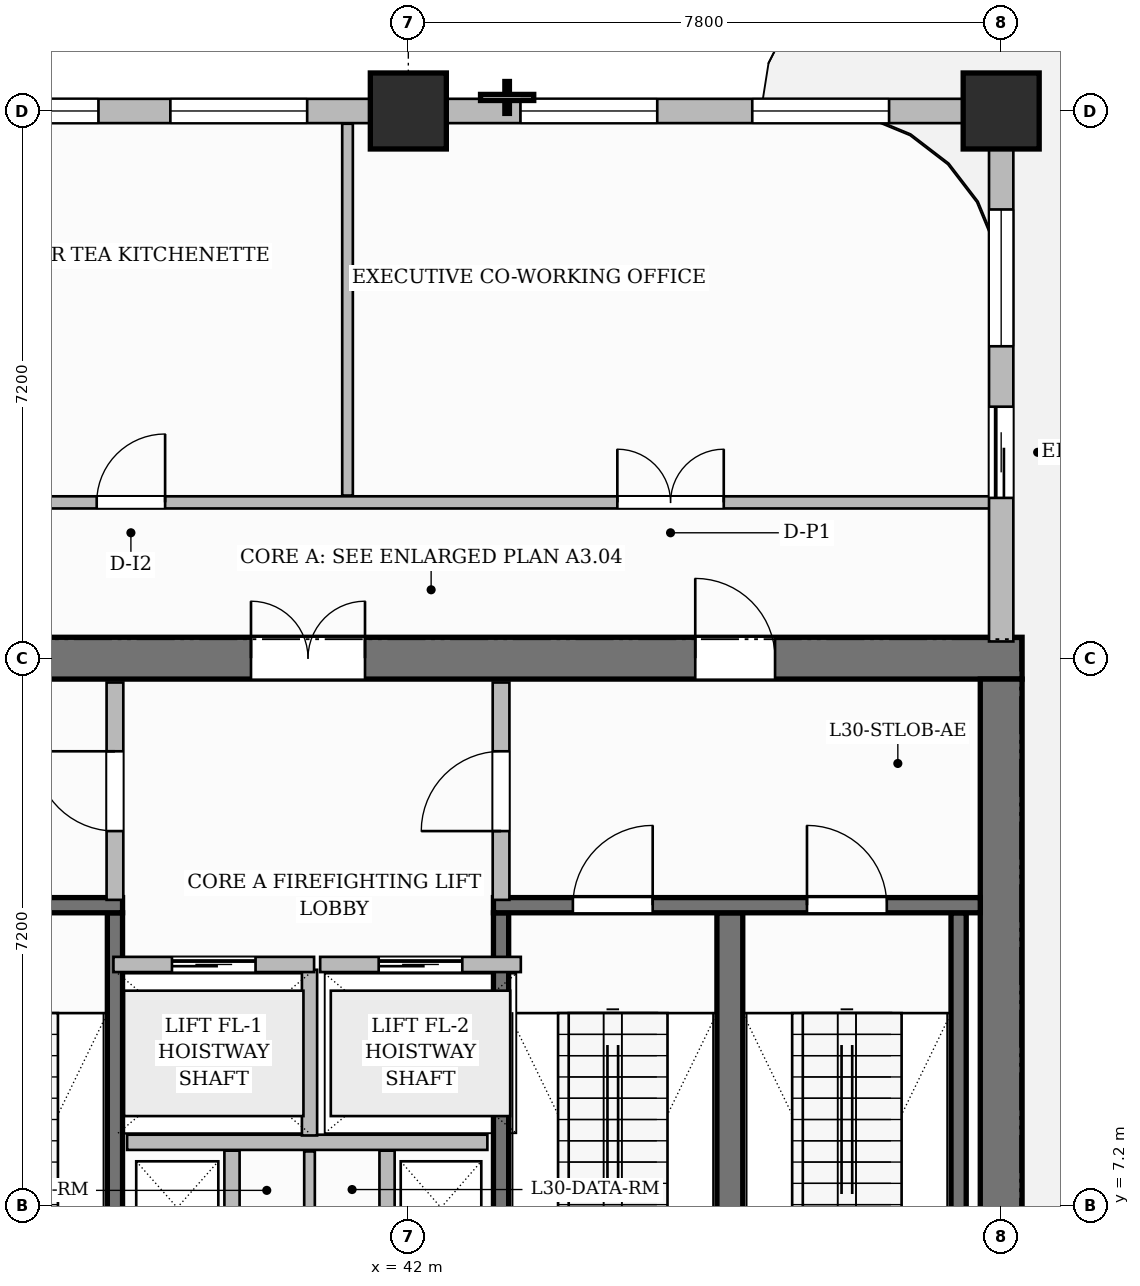
"""IFC4 building model, lengths in metres.
Left out: names, types, materials, properties, quantities, classifications, styles, units other than length and angle.
Written with IfcOpenShell. Run it as: python <this file> out.ifc"""

import sys

from ifc_helpers import new_model, si_unit, direction, frame, frame_2d, origin, origin_2d, place, context, subcontext, project, spatial, rectangle, extrude, source, transform, mapped, element, fill, save


model = new_model("IFC4")
c1 = context("Model", 3, precision=1e-05, world=origin(), true_north=direction((0.0, 1.0)))
c2 = subcontext(c1, "Body", "Model", "MODEL_VIEW")
j1 = project(units=[si_unit("LENGTHUNIT", "METRE"), si_unit("PLANEANGLEUNIT", "RADIAN")], contexts=[c1])
p1 = place(None, origin())
s1 = spatial("IfcSite", under=j1, at=p1, CompositionType="ELEMENT")
p2 = place(p1, origin())
s2 = spatial("IfcBuilding", under=s1, at=p2, CompositionType="ELEMENT")
p3 = place(p2, frame((0.0, 0.0, 122.9)))
s3 = spatial("IfcBuildingStorey", under=s2, at=p3, CompositionType="ELEMENT", Elevation=122.9)
p4 = place(p3, frame((34.525, 14.4, 0.0), z_axis=(0.0, 0.0, 1.0), x_axis=(1.0, 0.0, 0.0)))
e1 = element("IfcWall", 1, at=p4, inside=s3, PredefinedType="SHEAR", context=c2, shape_type="SweptSolid", body=[
    extrude(rectangle(XDim=15.55, YDim=0.55, at=frame_2d((7.775, 0.0))), origin(), (0.0, 0.0, 1.0), 3.7),
])
p5 = place(p4, frame((5.405, 0.0, 0.0)))
e2 = element("IfcOpeningElement", 2, at=p5, cuts=e1, PredefinedType="OPENING", context=c2, shape_type="SweptSolid", body=[
    extrude(rectangle(XDim=1.5, YDim=2.2, at=frame_2d((0.75, 1.1))), frame((0.0, 0.285, 0.0), z_axis=(0.0, -1.0, 0.0), x_axis=(1.0, 0.0, 0.0)), (0.0, 0.0, 1.0), 0.57),
])
p6 = place(p4, frame((1.62, 0.0, 0.0)))
e3 = element("IfcOpeningElement", 3, at=p6, cuts=e1, PredefinedType="OPENING", context=c2, shape_type="SweptSolid", body=[
    extrude(rectangle(XDim=1.05, YDim=2.15, at=frame_2d((0.525, 1.075))), frame((0.0, 0.285, 0.0), z_axis=(0.0, -1.0, 0.0), x_axis=(1.0, 0.0, 0.0)), (0.0, 0.0, 1.0), 0.57),
])
p7 = place(p4, frame((11.25, 0.0, 0.0)))
e4 = element("IfcOpeningElement", 4, at=p7, cuts=e1, PredefinedType="OPENING", context=c2, shape_type="SweptSolid", body=[
    extrude(rectangle(XDim=1.05, YDim=2.15, at=frame_2d((0.525, 1.075))), frame((0.0, 0.285, 0.0), z_axis=(0.0, -1.0, 0.0), x_axis=(1.0, 0.0, 0.0)), (0.0, 0.0, 1.0), 0.57),
])
p8 = place(p3, frame((49.8, 3.875, 0.0), z_axis=(0.0, 0.0, 1.0), x_axis=(0.0, 1.0, 0.0)))
e5 = element("IfcWall", 5, at=p8, inside=s3, PredefinedType="SHEAR", context=c2, shape_type="SweptSolid", body=[
    extrude(rectangle(XDim=10.25, YDim=0.55, at=frame_2d((5.125, 0.0))), origin(), (0.0, 0.0, 1.0), 3.7),
])
m1 = source(origin(), c2, "Body", "SweptSolid", [
    extrude(rectangle(XDim=1.0, YDim=1.0, at=origin_2d()), origin(), (0.0, 0.0, 1.0), 3.7),
])
for number, where, z_axis, x_axis in (
    (6, (42.0, 21.6, 0.0), (0.0, 0.0, 1.0), (1.0, 0.0, 0.0)),
    (7, (49.8, 21.6, 0.0), (0.0, 0.0, 1.0), (1.0, 0.0, 0.0)),
):
    element("IfcColumn", number, at=place(p3, frame(where, z_axis=z_axis, x_axis=x_axis)), inside=s3, PredefinedType="COLUMN", context=c2, shape_type="MappedRepresentation", body=[
        mapped(m1, transform((0.0, 0.0, 0.0), scale=1.0)),
    ])
p9 = place(p3, frame((38.14, 4.1, 0.0), z_axis=(0.0, 0.0, 1.0), x_axis=(0.0, 1.0, 0.0)))
e8 = element("IfcWall", 8, at=p9, inside=s3, PredefinedType="SHEAR", context=c2, shape_type="SweptSolid", body=[
    extrude(rectangle(XDim=6.95, YDim=0.2, at=frame_2d((3.475, 0.0))), origin(), (0.0, 0.0, 1.0), 3.7),
])
p10 = place(p3, frame((35.075, 11.15, 0.0), z_axis=(0.0, 0.0, 1.0), x_axis=(1.0, 0.0, 0.0)))
e9 = element("IfcWall", 9, at=p10, inside=s3, PredefinedType="SHEAR", context=c2, shape_type="SweptSolid", body=[
    extrude(rectangle(XDim=3.165, YDim=0.2, at=frame_2d((1.583, 0.0))), origin(), (0.0, 0.0, 1.0), 3.7),
])
p11 = place(p10, frame((1.07, 0.0, 0.0)))
e10 = element("IfcOpeningElement", 10, at=p11, cuts=e9, PredefinedType="OPENING", context=c2, shape_type="SweptSolid", body=[
    extrude(rectangle(XDim=1.05, YDim=2.2, at=frame_2d((0.525, 1.1))), frame((0.0, 0.11, 0.0), z_axis=(0.0, -1.0, 0.0), x_axis=(1.0, 0.0, 0.0)), (0.0, 0.0, 1.0), 0.22),
])
p12 = place(p3, frame((43.22, 4.1, 0.0), z_axis=(0.0, 0.0, 1.0), x_axis=(0.0, 1.0, 0.0)))
e11 = element("IfcWall", 11, at=p12, inside=s3, PredefinedType="SHEAR", context=c2, shape_type="SweptSolid", body=[
    extrude(rectangle(XDim=6.95, YDim=0.2, at=frame_2d((3.475, 0.0))), origin(), (0.0, 0.0, 1.0), 3.7),
])
p13 = place(p3, frame((46.23, 4.1, 0.0), z_axis=(0.0, 0.0, 1.0), x_axis=(0.0, 1.0, 0.0)))
e12 = element("IfcWall", 12, at=p13, inside=s3, PredefinedType="SHEAR", context=c2, shape_type="SweptSolid", body=[
    extrude(rectangle(XDim=6.95, YDim=0.34, at=frame_2d((3.475, 0.0))), origin(), (0.0, 0.0, 1.0), 3.7),
])
p14 = place(p3, frame((49.24, 4.1, 0.0), z_axis=(0.0, 0.0, 1.0), x_axis=(0.0, 1.0, 0.0)))
e13 = element("IfcWall", 13, at=p14, inside=s3, PredefinedType="SHEAR", context=c2, shape_type="SweptSolid", body=[
    extrude(rectangle(XDim=6.95, YDim=0.2, at=frame_2d((3.475, 0.0))), origin(), (0.0, 0.0, 1.0), 3.7),
])
p15 = place(p3, frame((43.12, 11.15, 0.0), z_axis=(0.0, 0.0, 1.0), x_axis=(1.0, 0.0, 0.0)))
e14 = element("IfcWall", 14, at=p15, inside=s3, PredefinedType="SHEAR", context=c2, shape_type="SweptSolid", body=[
    extrude(rectangle(XDim=6.405, YDim=0.2, at=frame_2d((3.202, 0.0))), origin(), (0.0, 0.0, 1.0), 3.7),
])
p16 = place(p15, frame((1.045, 0.0, 0.0)))
e15 = element("IfcOpeningElement", 15, at=p16, cuts=e14, PredefinedType="OPENING", context=c2, shape_type="SweptSolid", body=[
    extrude(rectangle(XDim=1.05, YDim=2.2, at=frame_2d((0.525, 1.1))), frame((0.0, 0.11, 0.0), z_axis=(0.0, -1.0, 0.0), x_axis=(1.0, 0.0, 0.0)), (0.0, 0.0, 1.0), 0.22),
])
p17 = place(p15, frame((4.125, 0.0, 0.0)))
e16 = element("IfcOpeningElement", 16, at=p17, cuts=e14, PredefinedType="OPENING", context=c2, shape_type="SweptSolid", body=[
    extrude(rectangle(XDim=1.05, YDim=2.2, at=frame_2d((0.525, 1.1))), frame((0.0, 0.11, 0.0), z_axis=(0.0, -1.0, 0.0), x_axis=(1.0, 0.0, 0.0)), (0.0, 0.0, 1.0), 0.22),
])
p18 = place(p3, frame((38.3, 8.03, 0.0), z_axis=(0.0, 0.0, 1.0), x_axis=(1.0, 0.0, 0.0)))
e17 = element("IfcWall", 17, at=p18, inside=s3, PredefinedType="PARTITIONING", context=c2, shape_type="SweptSolid", body=[
    extrude(rectangle(XDim=4.74, YDim=0.2, at=frame_2d((2.37, 0.0))), origin(), (0.0, 0.0, 1.0), 3.45),
])
p19 = place(p3, frame((40.7, 8.12, 0.0), z_axis=(0.0, 0.0, 1.0), x_axis=(0.0, 1.0, 0.0)))
e18 = element("IfcWall", 18, at=p19, inside=s3, PredefinedType="PARTITIONING", context=c2, shape_type="SweptSolid", body=[
    extrude(rectangle(XDim=2.18, YDim=0.2, at=frame_2d((1.09, 0.0))), origin(), (0.0, 0.0, 1.0), 3.45),
])
p20 = place(p3, frame((38.14, 11.22, 0.0), z_axis=(0.0, 0.0, 1.0), x_axis=(0.0, 1.0, 0.0)))
e19 = element("IfcWall", 19, at=p20, inside=s3, PredefinedType="PARTITIONING", context=c2, shape_type="SweptSolid", body=[
    extrude(rectangle(XDim=2.86, YDim=0.22, at=frame_2d((1.43, 0.0))), origin(), (0.0, 0.0, 1.0), 3.45),
])
p21 = place(p20, frame((0.905, 0.0, 0.0)))
e20 = element("IfcOpeningElement", 20, at=p21, cuts=e19, PredefinedType="OPENING", context=c2, shape_type="SweptSolid", body=[
    extrude(rectangle(XDim=1.05, YDim=2.15, at=frame_2d((0.525, 1.075))), frame((0.0, 0.12, 0.0), z_axis=(0.0, -1.0, 0.0), x_axis=(1.0, 0.0, 0.0)), (0.0, 0.0, 1.0), 0.24),
])
p22 = place(p3, frame((43.22, 11.22, 0.0), z_axis=(0.0, 0.0, 1.0), x_axis=(0.0, 1.0, 0.0)))
e21 = element("IfcWall", 21, at=p22, inside=s3, PredefinedType="PARTITIONING", context=c2, shape_type="SweptSolid", body=[
    extrude(rectangle(XDim=2.86, YDim=0.22, at=frame_2d((1.43, 0.0))), origin(), (0.0, 0.0, 1.0), 3.45),
])
p23 = place(p22, frame((0.905, 0.0, 0.0)))
e22 = element("IfcOpeningElement", 22, at=p23, cuts=e21, PredefinedType="OPENING", context=c2, shape_type="SweptSolid", body=[
    extrude(rectangle(XDim=1.05, YDim=2.15, at=frame_2d((0.525, 1.075))), frame((0.0, 0.12, 0.0), z_axis=(0.0, -1.0, 0.0), x_axis=(1.0, 0.0, 0.0)), (0.0, 0.0, 1.0), 0.24),
])
for number, where, z_axis, x_axis in (
    (23, (39.68, 6.13, 0.0), (0.0, 0.0, 1.0), (0.0, 1.0, 0.0)),
    (24, (41.72, 6.13, 0.0), (0.0, 0.0, 1.0), (0.0, 1.0, 0.0)),
):
    element("IfcWall", number, at=place(p3, frame(where, z_axis=z_axis, x_axis=x_axis)), inside=s3, PredefinedType="PARTITIONING", context=c2, shape_type="SweptSolid", body=[
        extrude(rectangle(XDim=1.79, YDim=0.2, at=frame_2d((0.895, 0.0))), origin(), (0.0, 0.0, 1.0), 3.45),
    ])
p24 = place(p3, frame((40.7, 3.895, 0.0), z_axis=(0.0, 0.0, 1.0), x_axis=(0.0, 1.0, 0.0)))
e25 = element("IfcWall", 25, at=p24, inside=s3, PredefinedType="PARTITIONING", context=c2, shape_type="SweptSolid", body=[
    extrude(rectangle(XDim=4.015, YDim=0.14, at=frame_2d((2.007, 0.0))), origin(), (0.0, 0.0, 1.0), 3.45),
])
p25 = place(p3, frame((32.19, 16.45, 0.0), z_axis=(0.0, 0.0, 1.0), x_axis=(1.0, 0.0, 0.0)))
e26 = element("IfcWall", 26, at=p25, inside=s3, PredefinedType="PARTITIONING", context=c2, shape_type="SweptSolid", body=[
    extrude(rectangle(XDim=17.47, YDim=0.16, at=frame_2d((8.735, 0.0))), origin(), (0.0, 0.0, 1.0), 3.45),
])
p26 = place(p25, frame((1.185, 0.0, 0.0)))
e27 = element("IfcOpeningElement", 27, at=p26, cuts=e26, PredefinedType="OPENING", context=c2, shape_type="SweptSolid", body=[
    extrude(rectangle(XDim=0.85, YDim=2.1, at=frame_2d((0.425, 1.05))), frame((0.0, 0.09, 0.0), z_axis=(0.0, -1.0, 0.0), x_axis=(1.0, 0.0, 0.0)), (0.0, 0.0, 1.0), 0.18),
])
p27 = place(p25, frame((5.71, 0.0, 0.0)))
e28 = element("IfcOpeningElement", 28, at=p27, cuts=e26, PredefinedType="OPENING", context=c2, shape_type="SweptSolid", body=[
    extrude(rectangle(XDim=0.9, YDim=2.15, at=frame_2d((0.45, 1.075))), frame((0.0, 0.09, 0.0), z_axis=(0.0, -1.0, 0.0), x_axis=(1.0, 0.0, 0.0)), (0.0, 0.0, 1.0), 0.18),
])
p28 = place(p25, frame((12.56, 0.0, 0.0)))
e29 = element("IfcOpeningElement", 29, at=p28, cuts=e26, PredefinedType="OPENING", context=c2, shape_type="SweptSolid", body=[
    extrude(rectangle(XDim=1.4, YDim=2.35, at=frame_2d((0.7, 1.175))), frame((0.0, 0.09, 0.0), z_axis=(0.0, -1.0, 0.0), x_axis=(1.0, 0.0, 0.0)), (0.0, 0.0, 1.0), 0.18),
])
p29 = place(p3, frame((41.2, 16.54, 0.0), z_axis=(0.0, 0.0, 1.0), x_axis=(0.0, 1.0, 0.0)))
e30 = element("IfcWall", 30, at=p29, inside=s3, PredefinedType="PARTITIONING", context=c2, shape_type="SweptSolid", body=[
    extrude(rectangle(XDim=4.892, YDim=0.14, at=frame_2d((2.446, 0.0))), origin(), (0.0, 0.0, 1.0), 3.45),
])
p30 = place(p3, frame((38.12, 10.37, 0.0), z_axis=(0.0, 0.0, 1.0), x_axis=(1.0, 0.0, 0.0)))
e31 = element("IfcWall", 31, at=p30, inside=s3, PredefinedType="PARTITIONING", context=c2, shape_type="SweptSolid", body=[
    extrude(rectangle(XDim=2.64, YDim=0.2, at=frame_2d((1.32, 0.0))), origin(), (0.0, 0.0, 1.0), 3.45),
])
p31 = place(p30, frame((0.77, 0.0, 0.0)))
e32 = element("IfcOpeningElement", 32, at=p31, cuts=e31, PredefinedType="OPENING", context=c2, shape_type="SweptSolid", body=[
    extrude(rectangle(XDim=1.1, YDim=2.2, at=frame_2d((0.55, 1.1))), frame((0.0, 0.11, 0.0), z_axis=(0.0, -1.0, 0.0), x_axis=(1.0, 0.0, 0.0)), (0.0, 0.0, 1.0), 0.22),
])
p32 = place(p3, frame((40.84, 10.37, 0.0), z_axis=(0.0, 0.0, 1.0), x_axis=(1.0, 0.0, 0.0)))
e33 = element("IfcWall", 33, at=p32, inside=s3, PredefinedType="PARTITIONING", context=c2, shape_type="SweptSolid", body=[
    extrude(rectangle(XDim=2.64, YDim=0.2, at=frame_2d((1.32, 0.0))), origin(), (0.0, 0.0, 1.0), 3.45),
])
p33 = place(p32, frame((0.77, 0.0, 0.0)))
e34 = element("IfcOpeningElement", 34, at=p33, cuts=e33, PredefinedType="OPENING", context=c2, shape_type="SweptSolid", body=[
    extrude(rectangle(XDim=1.1, YDim=2.2, at=frame_2d((0.55, 1.1))), frame((0.0, 0.11, 0.0), z_axis=(0.0, -1.0, 0.0), x_axis=(1.0, 0.0, 0.0)), (0.0, 0.0, 1.0), 0.22),
])
p34 = place(p3, frame((49.8, 14.62, 0.0), z_axis=(0.0, 0.0, 1.0), x_axis=(0.0, 1.0, 0.0)))
e35 = element("IfcWall", 35, at=p34, inside=s3, PredefinedType="SOLIDWALL", context=c2, shape_type="SweptSolid", body=[
    extrude(rectangle(XDim=6.93, YDim=0.32, at=frame_2d((3.465, 0.0))), origin(), (0.0, 0.0, 1.0), 2.935),
])
p35 = place(p34, frame((1.889, 0.0, 0.0)))
e36 = element("IfcOpeningElement", 36, at=p35, cuts=e35, PredefinedType="OPENING", context=c2, shape_type="SweptSolid", body=[
    extrude(rectangle(XDim=1.2, YDim=2.2, at=frame_2d((0.6, 1.1))), frame((0.0, 0.17, 0.0), z_axis=(0.0, -1.0, 0.0), x_axis=(1.0, 0.0, 0.0)), (0.0, 0.0, 1.0), 0.34),
])
p36 = place(p34, frame((3.884, 0.0, 0.8)))
e37 = element("IfcOpeningElement", 37, at=p36, cuts=e35, PredefinedType="OPENING", context=c2, shape_type="SweptSolid", body=[
    extrude(rectangle(XDim=1.8, YDim=1.85, at=frame_2d((0.9, 0.925))), frame((0.0, 0.17, 0.0), z_axis=(0.0, -1.0, 0.0), x_axis=(1.0, 0.0, 0.0)), (0.0, 0.0, 1.0), 0.34),
])
p37 = place(p3, frame((34.8, 21.6, 0.0), z_axis=(0.0, 0.0, 1.0), x_axis=(1.0, 0.0, 0.0)))
e38 = element("IfcWall", 38, at=p37, inside=s3, PredefinedType="SOLIDWALL", context=c2, shape_type="SweptSolid", body=[
    extrude(rectangle(XDim=15.0, YDim=0.32, at=frame_2d((7.5, 0.0))), origin(), (0.0, 0.0, 1.0), 2.935),
])
p38 = place(p37, frame((1.323, 0.0, 0.8)))
e39 = element("IfcOpeningElement", 39, at=p38, cuts=e38, PredefinedType="OPENING", context=c2, shape_type="SweptSolid", body=[
    extrude(rectangle(XDim=1.8, YDim=1.85, at=frame_2d((0.9, 0.925))), frame((0.0, 0.17, 0.0), z_axis=(0.0, -1.0, 0.0), x_axis=(1.0, 0.0, 0.0)), (0.0, 0.0, 1.0), 0.34),
])
p39 = place(p37, frame((4.069, 0.0, 0.8)))
e40 = element("IfcOpeningElement", 40, at=p39, cuts=e38, PredefinedType="OPENING", context=c2, shape_type="SweptSolid", body=[
    extrude(rectangle(XDim=1.8, YDim=1.85, at=frame_2d((0.9, 0.925))), frame((0.0, 0.17, 0.0), z_axis=(0.0, -1.0, 0.0), x_axis=(1.0, 0.0, 0.0)), (0.0, 0.0, 1.0), 0.34),
])
p40 = place(p37, frame((8.675, 0.0, 0.8)))
e41 = element("IfcOpeningElement", 41, at=p40, cuts=e38, PredefinedType="OPENING", context=c2, shape_type="SweptSolid", body=[
    extrude(rectangle(XDim=1.8, YDim=1.85, at=frame_2d((0.9, 0.925))), frame((0.0, 0.17, 0.0), z_axis=(0.0, -1.0, 0.0), x_axis=(1.0, 0.0, 0.0)), (0.0, 0.0, 1.0), 0.34),
])
p41 = place(p37, frame((11.725, 0.0, 0.8)))
e42 = element("IfcOpeningElement", 42, at=p41, cuts=e38, PredefinedType="OPENING", context=c2, shape_type="SweptSolid", body=[
    extrude(rectangle(XDim=1.8, YDim=1.85, at=frame_2d((0.9, 0.925))), frame((0.0, 0.17, 0.0), z_axis=(0.0, -1.0, 0.0), x_axis=(1.0, 0.0, 0.0)), (0.0, 0.0, 1.0), 0.34),
])
m2 = source(origin(), c2, "Body", "SweptSolid", [
    extrude(rectangle(XDim=1.05, YDim=2.2, at=frame_2d((0.525, 1.1))), frame((0.0, 0.025, 0.0), z_axis=(0.0, -1.0, 0.0), x_axis=(1.0, 0.0, 0.0)), (0.0, 0.0, 1.0), 0.05),
])
p42 = place(p16, origin())
e43 = element("IfcDoor", 43, at=p42, inside=s3, OperationType="SINGLE_SWING_RIGHT", PredefinedType="DOOR", context=c2, shape_type="MappedRepresentation", body=[
    mapped(m2, transform((0.0, 0.0, 0.0), scale=1.0)),
])
fill(e15, e43)
p43 = place(p17, origin())
e44 = element("IfcDoor", 44, at=p43, inside=s3, OperationType="SINGLE_SWING_LEFT", PredefinedType="DOOR", context=c2, shape_type="MappedRepresentation", body=[
    mapped(m2, transform((0.0, 0.0, 0.0), scale=1.0)),
])
fill(e16, e44)
m3 = source(origin(), c2, "Body", "SweptSolid", [
    extrude(rectangle(XDim=1.05, YDim=2.15, at=frame_2d((0.525, 1.075))), frame((0.0, 0.025, 0.0), z_axis=(0.0, -1.0, 0.0), x_axis=(1.0, 0.0, 0.0)), (0.0, 0.0, 1.0), 0.05),
])
p44 = place(p21, origin())
e45 = element("IfcDoor", 45, at=p44, inside=s3, OperationType="SINGLE_SWING_RIGHT", PredefinedType="DOOR", context=c2, shape_type="MappedRepresentation", body=[
    mapped(m3, transform((0.0, 0.0, 0.0), scale=1.0)),
])
fill(e20, e45)
p45 = place(p23, origin())
e46 = element("IfcDoor", 46, at=p45, inside=s3, OperationType="SINGLE_SWING_LEFT", PredefinedType="DOOR", context=c2, shape_type="MappedRepresentation", body=[
    mapped(m3, transform((0.0, 0.0, 0.0), scale=1.0)),
])
fill(e22, e46)
m4 = source(origin(), c2, "Body", "SweptSolid", [
    extrude(rectangle(XDim=1.5, YDim=2.2, at=frame_2d((0.75, 1.1))), frame((0.0, 0.025, 0.0), z_axis=(0.0, -1.0, 0.0), x_axis=(1.0, 0.0, 0.0)), (0.0, 0.0, 1.0), 0.05),
])
p46 = place(p5, origin())
e47 = element("IfcDoor", 47, at=p46, inside=s3, OperationType="DOUBLE_DOOR_SINGLE_SWING", PredefinedType="DOOR", context=c2, shape_type="MappedRepresentation", body=[
    mapped(m4, transform((0.0, 0.0, 0.0), scale=1.0)),
])
fill(e2, e47)
p47 = place(p7, origin())
e48 = element("IfcDoor", 48, at=p47, inside=s3, OperationType="SINGLE_SWING_LEFT", PredefinedType="DOOR", context=c2, shape_type="MappedRepresentation", body=[
    mapped(m3, transform((0.0, 0.0, 0.0), scale=1.0)),
])
fill(e4, e48)
m5 = source(origin(), c2, "Body", "SweptSolid", [
    extrude(rectangle(XDim=0.9, YDim=2.15, at=frame_2d((0.45, 1.075))), frame((0.0, 0.025, 0.0), z_axis=(0.0, -1.0, 0.0), x_axis=(1.0, 0.0, 0.0)), (0.0, 0.0, 1.0), 0.05),
])
p48 = place(p27, origin())
e49 = element("IfcDoor", 49, at=p48, inside=s3, OperationType="SINGLE_SWING_RIGHT", PredefinedType="DOOR", context=c2, shape_type="MappedRepresentation", body=[
    mapped(m5, transform((0.0, 0.0, 0.0), scale=1.0)),
])
fill(e28, e49)
m6 = source(origin(), c2, "Body", "SweptSolid", [
    extrude(rectangle(XDim=1.4, YDim=2.35, at=frame_2d((0.7, 1.175))), frame((0.0, 0.025, 0.0), z_axis=(0.0, -1.0, 0.0), x_axis=(1.0, 0.0, 0.0)), (0.0, 0.0, 1.0), 0.05),
])
p49 = place(p28, origin())
e50 = element("IfcDoor", 50, at=p49, inside=s3, OperationType="DOUBLE_DOOR_SINGLE_SWING", PredefinedType="DOOR", context=c2, shape_type="MappedRepresentation", body=[
    mapped(m6, transform((0.0, 0.0, 0.0), scale=1.0)),
])
fill(e29, e50)
m7 = source(origin(), c2, "Body", "SweptSolid", [
    extrude(rectangle(XDim=1.1, YDim=2.2, at=frame_2d((0.55, 1.1))), frame((0.0, 0.025, 0.0), z_axis=(0.0, -1.0, 0.0), x_axis=(1.0, 0.0, 0.0)), (0.0, 0.0, 1.0), 0.05),
])
p50 = place(p31, origin())
e51 = element("IfcDoor", 51, at=p50, inside=s3, OperationType="SLIDING_TO_LEFT", PredefinedType="DOOR", context=c2, shape_type="MappedRepresentation", body=[
    mapped(m7, transform((0.0, 0.0, 0.0), scale=1.0)),
])
fill(e32, e51)
p51 = place(p33, origin())
e52 = element("IfcDoor", 52, at=p51, inside=s3, OperationType="SLIDING_TO_LEFT", PredefinedType="DOOR", context=c2, shape_type="MappedRepresentation", body=[
    mapped(m7, transform((0.0, 0.0, 0.0), scale=1.0)),
])
fill(e34, e52)
m8 = source(origin(), c2, "Body", "SweptSolid", [
    extrude(rectangle(XDim=1.2, YDim=2.2, at=frame_2d((0.6, 1.1))), frame((0.0, 0.025, 0.0), z_axis=(0.0, -1.0, 0.0), x_axis=(1.0, 0.0, 0.0)), (0.0, 0.0, 1.0), 0.05),
])
p52 = place(p35, origin())
e53 = element("IfcDoor", 53, at=p52, inside=s3, OperationType="SLIDING_TO_LEFT", PredefinedType="DOOR", context=c2, shape_type="MappedRepresentation", body=[
    mapped(m8, transform((0.0, 0.0, 0.0), scale=1.0)),
])
fill(e36, e53)
m9 = source(origin(), c2, "Body", "SweptSolid", [
    extrude(rectangle(XDim=1.8, YDim=1.85, at=frame_2d((0.9, 0.925))), frame((0.0, 0.03, 0.0), z_axis=(0.0, -1.0, 0.0), x_axis=(1.0, 0.0, 0.0)), (0.0, 0.0, 1.0), 0.06),
])
p53 = place(p36, origin())
e54 = element("IfcWindow", 54, at=p53, inside=s3, PartitioningType="DOUBLE_PANEL_VERTICAL", PredefinedType="WINDOW", context=c2, shape_type="MappedRepresentation", body=[
    mapped(m9, transform((0.0, 0.0, 0.0), scale=1.0)),
])
fill(e37, e54)
p54 = place(p38, origin())
e55 = element("IfcWindow", 55, at=p54, inside=s3, PartitioningType="DOUBLE_PANEL_VERTICAL", PredefinedType="WINDOW", context=c2, shape_type="MappedRepresentation", body=[
    mapped(m9, transform((0.0, 0.0, 0.0), scale=1.0)),
])
fill(e39, e55)
p55 = place(p39, origin())
e56 = element("IfcWindow", 56, at=p55, inside=s3, PartitioningType="DOUBLE_PANEL_VERTICAL", PredefinedType="WINDOW", context=c2, shape_type="MappedRepresentation", body=[
    mapped(m9, transform((0.0, 0.0, 0.0), scale=1.0)),
])
fill(e40, e56)
p56 = place(p40, origin())
e57 = element("IfcWindow", 57, at=p56, inside=s3, PartitioningType="DOUBLE_PANEL_VERTICAL", PredefinedType="WINDOW", context=c2, shape_type="MappedRepresentation", body=[
    mapped(m9, transform((0.0, 0.0, 0.0), scale=1.0)),
])
fill(e41, e57)
p57 = place(p41, origin())
e58 = element("IfcWindow", 58, at=p57, inside=s3, PartitioningType="DOUBLE_PANEL_VERTICAL", PredefinedType="WINDOW", context=c2, shape_type="MappedRepresentation", body=[
    mapped(m9, transform((0.0, 0.0, 0.0), scale=1.0)),
])
fill(e42, e58)
save(model, sys.argv[1])
